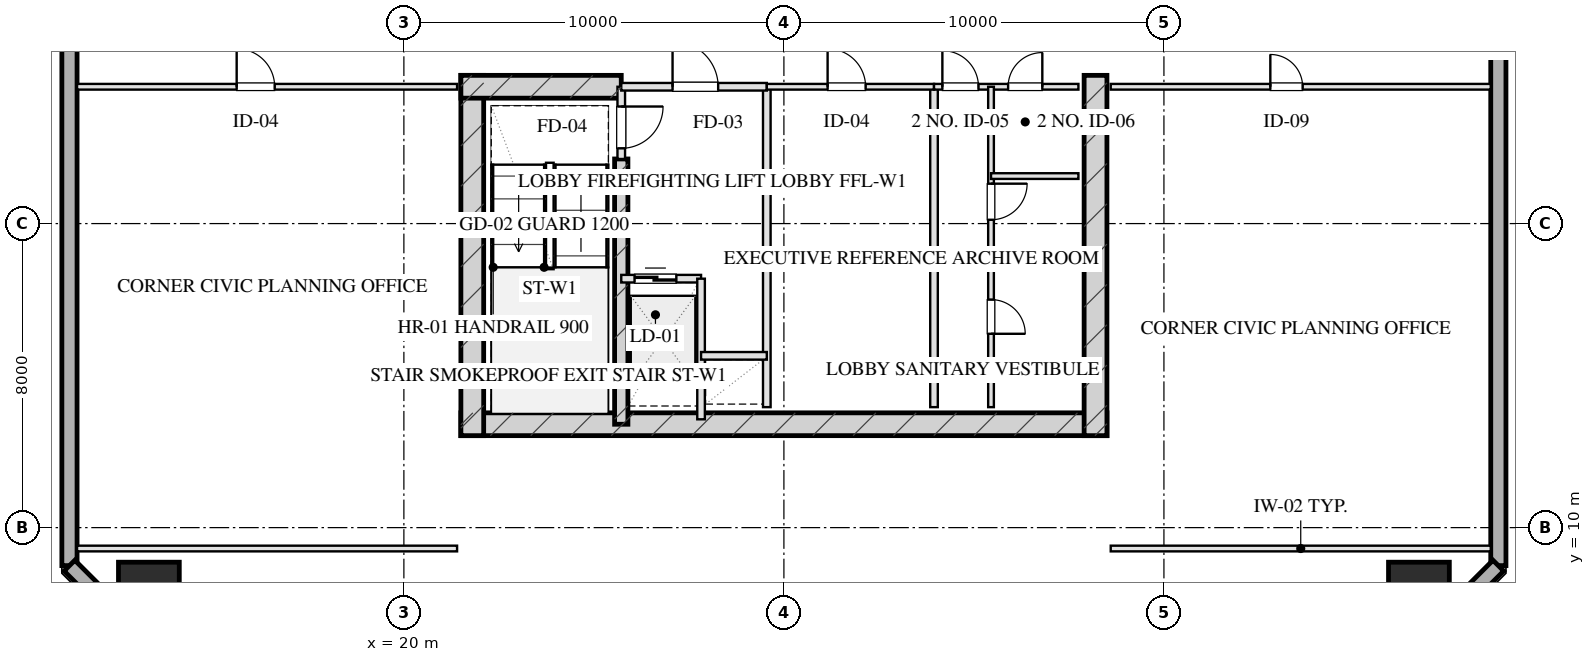
"""IFC4 building model, lengths in metres.
Left out: names, types, materials, properties, quantities, classifications, styles, units other than length and angle.
Written with IfcOpenShell. Run it as: python <this file> out.ifc"""

import sys

from ifc_helpers import new_model, si_unit, direction, frame, frame_2d, origin, origin_2d, place, context, subcontext, project, spatial, rectangle, hollow_rectangle, extrude, element, fill, save


model = new_model("IFC4")
c1 = context("Model", 3, precision=1e-05, world=origin(), true_north=direction((0.0, 1.0)))
c2 = subcontext(c1, "Body", "Model", "MODEL_VIEW")
j1 = project(units=[si_unit("LENGTHUNIT", "METRE"), si_unit("PLANEANGLEUNIT", "RADIAN")], contexts=[c1])
p1 = place(None, origin())
s1 = spatial("IfcSite", under=j1, at=p1, CompositionType="ELEMENT")
p2 = place(p1, origin())
s2 = spatial("IfcBuilding", under=s1, at=p2, CompositionType="ELEMENT")
p3 = place(p2, frame((0.0, 0.0, 142.6)))
s3 = spatial("IfcBuildingStorey", under=s2, at=p3, CompositionType="ELEMENT", Elevation=142.6)
p4 = place(p3, frame((21.5, 12.72, 0.0), z_axis=(0.0, 0.0, 1.0), x_axis=(1.0, 0.0, 0.0)))
e1 = element("IfcWall", 1, at=p4, inside=s3, PredefinedType="SHEAR", context=c2, shape_type="SweptSolid", body=[
    extrude(rectangle(XDim=17.0, YDim=0.6, at=frame_2d((8.5, 0.0))), origin(), (0.0, 0.0, 1.0), 3.45),
])
for number, where, z_axis, x_axis in (
    (2, (21.8, 21.9, 0.0), (0.0, 0.0, 1.0), (0.0, -1.0, 0.0)),
    (3, (38.2, 21.9, 0.0), (0.0, 0.0, 1.0), (0.0, -1.0, 0.0)),
):
    element("IfcWall", number, at=place(p3, frame(where, z_axis=z_axis, x_axis=x_axis)), inside=s3, PredefinedType="SHEAR", context=c2, shape_type="SweptSolid", body=[
        extrude(rectangle(XDim=9.48, YDim=0.6, at=frame_2d((4.74, 0.0))), origin(), (0.0, 0.0, 1.0), 3.45),
    ])
p5 = place(p3, frame((25.72, 19.7, 0.0), z_axis=(0.0, 0.0, 1.0), x_axis=(0.0, -1.0, 0.0)))
e4 = element("IfcWall", 4, at=p5, inside=s3, PredefinedType="SHEAR", context=c2, shape_type="SweptSolid", body=[
    extrude(rectangle(XDim=6.98, YDim=0.35, at=frame_2d((3.49, 0.0))), origin(), (0.0, 0.0, 1.0), 3.45),
])
p6 = place(p3, frame((21.5, 21.6, 0.0), z_axis=(0.0, 0.0, 1.0), x_axis=(1.0, 0.0, 0.0)))
e5 = element("IfcWall", 5, at=p6, inside=s3, PredefinedType="SHEAR", context=c2, shape_type="SweptSolid", body=[
    extrude(rectangle(XDim=4.22, YDim=0.6, at=frame_2d((2.11, 0.0))), origin(), (0.0, 0.0, 1.0), 3.45),
])
for number, where, z_axis, x_axis in (
    (6, (13.29, 8.29, 0.0), (0.0, 0.0, 1.0), (1.0, 0.0, 0.0)),
    (7, (46.71, 8.29, 0.0), (0.0, 0.0, 1.0), (1.0, 0.0, 0.0)),
):
    element("IfcColumn", number, at=place(p3, frame(where, z_axis=z_axis, x_axis=x_axis)), inside=s3, PredefinedType="COLUMN", context=c2, shape_type="SweptSolid", body=[
        extrude(hollow_rectangle(XDim=1.6, YDim=1.6, WallThickness=0.055, at=origin_2d()), origin(), (0.0, 0.0, 1.0), 3.451),
    ])
p7 = place(p3, frame((11.2, 9.0, 0.0), z_axis=(0.0, 0.0, 1.0), x_axis=(0.0, 1.0, 0.0)))
e8 = element("IfcWall", 8, at=p7, inside=s3, PredefinedType="SOLIDWALL", context=c2, shape_type="SweptSolid", body=[
    extrude(rectangle(XDim=50.0, YDim=0.4, at=frame_2d((25.0, 0.0))), origin(), (0.0, 0.0, 1.0), 2.61),
])
p8 = place(p7, frame((28.85, 0.0, 0.0)))
e9 = element("IfcOpeningElement", 9, at=p8, cuts=e8, PredefinedType="OPENING", context=c2, shape_type="SweptSolid", body=[
    extrude(rectangle(XDim=1.1, YDim=2.15, at=frame_2d((0.55, 1.075))), frame((0.0, 0.21, 0.0), z_axis=(0.0, -1.0, 0.0), x_axis=(1.0, 0.0, 0.0)), (0.0, 0.0, 1.0), 0.42),
])
p9 = place(p3, frame((48.8, 59.0, 0.0), z_axis=(0.0, 0.0, 1.0), x_axis=(0.0, -1.0, 0.0)))
e10 = element("IfcWall", 10, at=p9, inside=s3, PredefinedType="SOLIDWALL", context=c2, shape_type="SweptSolid", body=[
    extrude(rectangle(XDim=50.0, YDim=0.4, at=frame_2d((25.0, 0.0))), origin(), (0.0, 0.0, 1.0), 2.61),
])
p10 = place(p9, frame((30.275, 0.0, 0.75)))
e11 = element("IfcOpeningElement", 11, at=p10, cuts=e10, PredefinedType="OPENING", context=c2, shape_type="SweptSolid", body=[
    extrude(rectangle(XDim=2.25, YDim=1.46, at=frame_2d((1.125, 0.73))), frame((0.0, 0.21, 0.0), z_axis=(0.0, -1.0, 0.0), x_axis=(1.0, 0.0, 0.0)), (0.0, 0.0, 1.0), 0.42),
])
p11 = place(p9, frame((18.65, 0.0, 0.0)))
e12 = element("IfcOpeningElement", 12, at=p11, cuts=e10, PredefinedType="OPENING", context=c2, shape_type="SweptSolid", body=[
    extrude(rectangle(XDim=1.1, YDim=2.15, at=frame_2d((0.55, 1.075))), frame((0.0, 0.21, 0.0), z_axis=(0.0, -1.0, 0.0), x_axis=(1.0, 0.0, 0.0)), (0.0, 0.0, 1.0), 0.42),
])
for number, where, z_axis, x_axis in (
    (13, (48.8, 9.0, 0.0), (0.0, 0.0, 1.0), (-0.707, -0.707, 0.0)),
    (14, (14.0, 6.2, 0.0), (0.0, 0.0, 1.0), (-0.707, 0.707, 0.0)),
):
    element("IfcWall", number, at=place(p3, frame(where, z_axis=z_axis, x_axis=x_axis)), inside=s3, PredefinedType="SOLIDWALL", context=c2, shape_type="SweptSolid", body=[
        extrude(rectangle(XDim=3.96, YDim=0.4, at=frame_2d((1.98, 0.0))), origin(), (0.0, 0.0, 1.0), 2.61),
    ])
p12 = place(p3, frame((25.72, 21.6, 0.0), z_axis=(0.0, 0.0, 1.0), x_axis=(0.0, -1.0, 0.0)))
e15 = element("IfcWall", 15, at=p12, inside=s3, PredefinedType="PARTITIONING", context=c2, shape_type="SweptSolid", body=[
    extrude(rectangle(XDim=1.9, YDim=0.2, at=frame_2d((0.95, 0.0))), origin(), (0.0, 0.0, 1.0), 3.175),
])
p13 = place(p12, frame((0.52, 0.0, 0.0)))
e16 = element("IfcOpeningElement", 16, at=p13, cuts=e15, PredefinedType="OPENING", context=c2, shape_type="SweptSolid", body=[
    extrude(rectangle(XDim=1.1, YDim=2.05, at=frame_2d((0.55, 1.025))), frame((0.0, 0.11, 0.0), z_axis=(0.0, -1.0, 0.0), x_axis=(1.0, 0.0, 0.0)), (0.0, 0.0, 1.0), 0.22),
])
p14 = place(p3, frame((29.55, 21.6, 0.0), z_axis=(0.0, 0.0, 1.0), x_axis=(0.0, -1.0, 0.0)))
e17 = element("IfcWall", 17, at=p14, inside=s3, PredefinedType="PARTITIONING", context=c2, shape_type="SweptSolid", body=[
    extrude(rectangle(XDim=8.43, YDim=0.2, at=frame_2d((4.215, 0.0))), origin(), (0.0, 0.0, 1.0), 3.175),
])
p15 = place(p3, frame((25.72, 21.6, 0.0), z_axis=(0.0, 0.0, 1.0), x_axis=(1.0, 0.0, 0.0)))
e18 = element("IfcWall", 18, at=p15, inside=s3, PredefinedType="PARTITIONING", context=c2, shape_type="SweptSolid", body=[
    extrude(rectangle(XDim=3.83, YDim=0.2, at=frame_2d((1.915, 0.0))), origin(), (0.0, 0.0, 1.0), 3.175),
])
p16 = place(p15, frame((1.35, 0.0, 0.0)))
e19 = element("IfcOpeningElement", 19, at=p16, cuts=e18, PredefinedType="OPENING", context=c2, shape_type="SweptSolid", body=[
    extrude(rectangle(XDim=1.2, YDim=2.05, at=frame_2d((0.6, 1.025))), frame((0.0, 0.11, 0.0), z_axis=(0.0, -1.0, 0.0), x_axis=(1.0, 0.0, 0.0)), (0.0, 0.0, 1.0), 0.22),
])
p17 = place(p3, frame((25.72, 16.55, 0.0), z_axis=(0.0, 0.0, 1.0), x_axis=(1.0, 0.0, 0.0)))
e20 = element("IfcWall", 20, at=p17, inside=s3, PredefinedType="PARTITIONING", context=c2, shape_type="SweptSolid", body=[
    extrude(rectangle(XDim=2.1, YDim=0.2, at=frame_2d((1.05, 0.0))), origin(), (0.0, 0.0, 1.0), 3.175),
])
p18 = place(p17, frame((0.35, 0.0, 0.0)))
e21 = element("IfcOpeningElement", 21, at=p18, cuts=e20, PredefinedType="OPENING", context=c2, shape_type="SweptSolid", body=[
    extrude(rectangle(XDim=1.1, YDim=2.05, at=frame_2d((0.55, 1.025))), frame((0.0, 0.11, 0.0), z_axis=(0.0, -1.0, 0.0), x_axis=(1.0, 0.0, 0.0)), (0.0, 0.0, 1.0), 0.22),
])
p19 = place(p3, frame((27.82, 16.55, 0.0), z_axis=(0.0, 0.0, 1.0), x_axis=(0.0, -1.0, 0.0)))
e22 = element("IfcWall", 22, at=p19, inside=s3, PredefinedType="PARTITIONING", context=c2, shape_type="SweptSolid", body=[
    extrude(rectangle(XDim=3.7, YDim=0.2, at=frame_2d((1.85, 0.0))), origin(), (0.0, 0.0, 1.0), 3.175),
])
p20 = place(p3, frame((27.82, 14.52, 0.0), z_axis=(0.0, 0.0, 1.0), x_axis=(1.0, 0.0, 0.0)))
e23 = element("IfcWall", 23, at=p20, inside=s3, PredefinedType="PARTITIONING", context=c2, shape_type="SweptSolid", body=[
    extrude(rectangle(XDim=1.73, YDim=0.2, at=frame_2d((0.865, 0.0))), origin(), (0.0, 0.0, 1.0), 3.175),
])
p21 = place(p3, frame((33.95, 21.6, 0.0), z_axis=(0.0, 0.0, 1.0), x_axis=(0.0, -1.0, 0.0)))
e24 = element("IfcWall", 24, at=p21, inside=s3, PredefinedType="PARTITIONING", context=c2, shape_type="SweptSolid", body=[
    extrude(rectangle(XDim=8.43, YDim=0.2, at=frame_2d((4.215, 0.0))), origin(), (0.0, 0.0, 1.0), 3.175),
])
p22 = place(p3, frame((29.55, 21.6, 0.0), z_axis=(0.0, 0.0, 1.0), x_axis=(1.0, 0.0, 0.0)))
e25 = element("IfcWall", 25, at=p22, inside=s3, PredefinedType="PARTITIONING", context=c2, shape_type="SweptSolid", body=[
    extrude(rectangle(XDim=4.4, YDim=0.15, at=frame_2d((2.2, 0.0))), origin(), (0.0, 0.0, 1.0), 3.175),
])
p23 = place(p22, frame((1.6, 0.0, 0.0)))
e26 = element("IfcOpeningElement", 26, at=p23, cuts=e25, PredefinedType="OPENING", context=c2, shape_type="SweptSolid", body=[
    extrude(rectangle(XDim=1.0, YDim=2.05, at=frame_2d((0.5, 1.025))), frame((0.0, 0.085, 0.0), z_axis=(0.0, -1.0, 0.0), x_axis=(1.0, 0.0, 0.0)), (0.0, 0.0, 1.0), 0.17),
])
p24 = place(p3, frame((33.95, 21.6, 0.0), z_axis=(0.0, 0.0, 1.0), x_axis=(1.0, 0.0, 0.0)))
e27 = element("IfcWall", 27, at=p24, inside=s3, PredefinedType="PARTITIONING", context=c2, shape_type="SweptSolid", body=[
    extrude(rectangle(XDim=3.8, YDim=0.15, at=frame_2d((1.9, 0.0))), origin(), (0.0, 0.0, 1.0), 3.175),
])
p25 = place(p24, frame((0.22, 0.0, 0.0)))
e28 = element("IfcOpeningElement", 28, at=p25, cuts=e27, PredefinedType="OPENING", context=c2, shape_type="SweptSolid", body=[
    extrude(rectangle(XDim=0.95, YDim=2.05, at=frame_2d((0.475, 1.025))), frame((0.0, 0.085, 0.0), z_axis=(0.0, -1.0, 0.0), x_axis=(1.0, 0.0, 0.0)), (0.0, 0.0, 1.0), 0.17),
])
p26 = place(p24, frame((1.95, 0.0, 0.0)))
e29 = element("IfcOpeningElement", 29, at=p26, cuts=e27, PredefinedType="OPENING", context=c2, shape_type="SweptSolid", body=[
    extrude(rectangle(XDim=0.9, YDim=2.05, at=frame_2d((0.45, 1.025))), frame((0.0, 0.085, 0.0), z_axis=(0.0, -1.0, 0.0), x_axis=(1.0, 0.0, 0.0)), (0.0, 0.0, 1.0), 0.17),
])
p27 = place(p3, frame((35.45, 21.6, 0.0), z_axis=(0.0, 0.0, 1.0), x_axis=(0.0, -1.0, 0.0)))
e30 = element("IfcWall", 30, at=p27, inside=s3, PredefinedType="PARTITIONING", context=c2, shape_type="SweptSolid", body=[
    extrude(rectangle(XDim=8.43, YDim=0.15, at=frame_2d((4.215, 0.0))), origin(), (0.0, 0.0, 1.0), 2.815),
])
p28 = place(p27, frame((2.55, 0.0, 0.0)))
e31 = element("IfcOpeningElement", 31, at=p28, cuts=e30, PredefinedType="OPENING", context=c2, shape_type="SweptSolid", body=[
    extrude(rectangle(XDim=0.95, YDim=2.05, at=frame_2d((0.475, 1.025))), frame((0.0, 0.085, 0.0), z_axis=(0.0, -1.0, 0.0), x_axis=(1.0, 0.0, 0.0)), (0.0, 0.0, 1.0), 0.17),
])
p29 = place(p27, frame((5.6, 0.0, 0.0)))
e32 = element("IfcOpeningElement", 32, at=p29, cuts=e30, PredefinedType="OPENING", context=c2, shape_type="SweptSolid", body=[
    extrude(rectangle(XDim=0.9, YDim=2.05, at=frame_2d((0.45, 1.025))), frame((0.0, 0.085, 0.0), z_axis=(0.0, -1.0, 0.0), x_axis=(1.0, 0.0, 0.0)), (0.0, 0.0, 1.0), 0.17),
])
for number, where, z_axis, x_axis in (
    (33, (35.45, 17.2, 0.0), (0.0, 0.0, 1.0), (1.0, 0.0, 0.0)),
    (34, (35.45, 19.25, 0.0), (0.0, 0.0, 1.0), (1.0, 0.0, 0.0)),
):
    element("IfcWall", number, at=place(p3, frame(where, z_axis=z_axis, x_axis=x_axis)), inside=s3, PredefinedType="PARTITIONING", context=c2, shape_type="SweptSolid", body=[
        extrude(rectangle(XDim=2.3, YDim=0.15, at=frame_2d((1.15, 0.0))), origin(), (0.0, 0.0, 1.0), 3.175),
    ])
p30 = place(p3, frame((11.4, 9.45, 0.0), z_axis=(0.0, 0.0, 1.0), x_axis=(1.0, 0.0, 0.0)))
e35 = element("IfcWall", 35, at=p30, inside=s3, PredefinedType="PARTITIONING", context=c2, shape_type="SweptSolid", body=[
    extrude(rectangle(XDim=10.0, YDim=0.15, at=frame_2d((5.0, 0.0))), origin(), (0.0, 0.0, 1.0), 3.175),
])
p31 = place(p3, frame((11.4, 21.6, 0.0), z_axis=(0.0, 0.0, 1.0), x_axis=(1.0, 0.0, 0.0)))
e36 = element("IfcWall", 36, at=p31, inside=s3, PredefinedType="PARTITIONING", context=c2, shape_type="SweptSolid", body=[
    extrude(rectangle(XDim=10.0, YDim=0.15, at=frame_2d((5.0, 0.0))), origin(), (0.0, 0.0, 1.0), 3.175),
])
p32 = place(p31, frame((4.2, 0.0, 0.0)))
e37 = element("IfcOpeningElement", 37, at=p32, cuts=e36, PredefinedType="OPENING", context=c2, shape_type="SweptSolid", body=[
    extrude(rectangle(XDim=1.0, YDim=2.05, at=frame_2d((0.5, 1.025))), frame((0.0, 0.085, 0.0), z_axis=(0.0, -1.0, 0.0), x_axis=(1.0, 0.0, 0.0)), (0.0, 0.0, 1.0), 0.17),
])
p33 = place(p3, frame((38.6, 9.45, 0.0), z_axis=(0.0, 0.0, 1.0), x_axis=(1.0, 0.0, 0.0)))
e38 = element("IfcWall", 38, at=p33, inside=s3, PredefinedType="PARTITIONING", context=c2, shape_type="SweptSolid", body=[
    extrude(rectangle(XDim=10.0, YDim=0.15, at=frame_2d((5.0, 0.0))), origin(), (0.0, 0.0, 1.0), 3.175),
])
p34 = place(p3, frame((38.6, 21.6, 0.0), z_axis=(0.0, 0.0, 1.0), x_axis=(1.0, 0.0, 0.0)))
e39 = element("IfcWall", 39, at=p34, inside=s3, PredefinedType="PARTITIONING", context=c2, shape_type="SweptSolid", body=[
    extrude(rectangle(XDim=10.0, YDim=0.15, at=frame_2d((5.0, 0.0))), origin(), (0.0, 0.0, 1.0), 3.175),
])
p35 = place(p34, frame((4.2, 0.0, 0.0)))
e40 = element("IfcOpeningElement", 40, at=p35, cuts=e39, PredefinedType="OPENING", context=c2, shape_type="SweptSolid", body=[
    extrude(rectangle(XDim=0.85, YDim=2.05, at=frame_2d((0.425, 1.025))), frame((0.0, 0.085, 0.0), z_axis=(0.0, -1.0, 0.0), x_axis=(1.0, 0.0, 0.0)), (0.0, 0.0, 1.0), 0.17),
])
p36 = place(p13, origin())
e41 = element("IfcDoor", 41, at=p36, inside=s3, OperationType="SINGLE_SWING_LEFT", PredefinedType="DOOR", context=c2, shape_type="SweptSolid", body=[
    extrude(rectangle(XDim=1.1, YDim=2.05, at=frame_2d((0.55, 1.025))), frame((0.0, 0.025, 0.0), z_axis=(0.0, -1.0, 0.0), x_axis=(1.0, 0.0, 0.0)), (0.0, 0.0, 1.0), 0.05),
])
fill(e16, e41)
p37 = place(p16, origin())
e42 = element("IfcDoor", 42, at=p37, inside=s3, OperationType="SINGLE_SWING_LEFT", PredefinedType="DOOR", context=c2, shape_type="SweptSolid", body=[
    extrude(rectangle(XDim=1.2, YDim=2.05, at=frame_2d((0.6, 1.025))), frame((0.0, 0.025, 0.0), z_axis=(0.0, -1.0, 0.0), x_axis=(1.0, 0.0, 0.0)), (0.0, 0.0, 1.0), 0.05),
])
fill(e19, e42)
p38 = place(p18, origin())
e43 = element("IfcDoor", 43, at=p38, inside=s3, OperationType="DOUBLE_DOOR_SLIDING", PredefinedType="DOOR", context=c2, shape_type="SweptSolid", body=[
    extrude(rectangle(XDim=1.1, YDim=2.05, at=frame_2d((0.55, 1.025))), frame((0.0, 0.025, 0.0), z_axis=(0.0, -1.0, 0.0), x_axis=(1.0, 0.0, 0.0)), (0.0, 0.0, 1.0), 0.05),
])
fill(e21, e43)
p39 = place(p23, origin())
e44 = element("IfcDoor", 44, at=p39, inside=s3, OperationType="SINGLE_SWING_LEFT", PredefinedType="DOOR", context=c2, shape_type="SweptSolid", body=[
    extrude(rectangle(XDim=1.0, YDim=2.05, at=frame_2d((0.5, 1.025))), frame((0.0, 0.025, 0.0), z_axis=(0.0, -1.0, 0.0), x_axis=(1.0, 0.0, 0.0)), (0.0, 0.0, 1.0), 0.05),
])
fill(e26, e44)
p40 = place(p25, origin())
e45 = element("IfcDoor", 45, at=p40, inside=s3, OperationType="SINGLE_SWING_LEFT", PredefinedType="DOOR", context=c2, shape_type="SweptSolid", body=[
    extrude(rectangle(XDim=0.95, YDim=2.05, at=frame_2d((0.475, 1.025))), frame((0.0, 0.025, 0.0), z_axis=(0.0, -1.0, 0.0), x_axis=(1.0, 0.0, 0.0)), (0.0, 0.0, 1.0), 0.05),
])
fill(e28, e45)
p41 = place(p26, origin())
e46 = element("IfcDoor", 46, at=p41, inside=s3, OperationType="SINGLE_SWING_RIGHT", PredefinedType="DOOR", context=c2, shape_type="SweptSolid", body=[
    extrude(rectangle(XDim=0.9, YDim=2.05, at=frame_2d((0.45, 1.025))), frame((0.0, 0.025, 0.0), z_axis=(0.0, -1.0, 0.0), x_axis=(1.0, 0.0, 0.0)), (0.0, 0.0, 1.0), 0.05),
])
fill(e29, e46)
p42 = place(p28, origin())
e47 = element("IfcDoor", 47, at=p42, inside=s3, OperationType="SINGLE_SWING_LEFT", PredefinedType="DOOR", context=c2, shape_type="SweptSolid", body=[
    extrude(rectangle(XDim=0.95, YDim=2.05, at=frame_2d((0.475, 1.025))), frame((0.0, 0.025, 0.0), z_axis=(0.0, -1.0, 0.0), x_axis=(1.0, 0.0, 0.0)), (0.0, 0.0, 1.0), 0.05),
])
fill(e31, e47)
p43 = place(p29, origin())
e48 = element("IfcDoor", 48, at=p43, inside=s3, OperationType="SINGLE_SWING_RIGHT", PredefinedType="DOOR", context=c2, shape_type="SweptSolid", body=[
    extrude(rectangle(XDim=0.9, YDim=2.05, at=frame_2d((0.45, 1.025))), frame((0.0, 0.025, 0.0), z_axis=(0.0, -1.0, 0.0), x_axis=(1.0, 0.0, 0.0)), (0.0, 0.0, 1.0), 0.05),
])
fill(e32, e48)
p44 = place(p32, origin())
e49 = element("IfcDoor", 49, at=p44, inside=s3, OperationType="SINGLE_SWING_LEFT", PredefinedType="DOOR", context=c2, shape_type="SweptSolid", body=[
    extrude(rectangle(XDim=1.0, YDim=2.05, at=frame_2d((0.5, 1.025))), frame((0.0, 0.025, 0.0), z_axis=(0.0, -1.0, 0.0), x_axis=(1.0, 0.0, 0.0)), (0.0, 0.0, 1.0), 0.05),
])
fill(e37, e49)
p45 = place(p35, origin())
e50 = element("IfcDoor", 50, at=p45, inside=s3, OperationType="SINGLE_SWING_LEFT", PredefinedType="DOOR", context=c2, shape_type="SweptSolid", body=[
    extrude(rectangle(XDim=0.85, YDim=2.05, at=frame_2d((0.425, 1.025))), frame((0.0, 0.025, 0.0), z_axis=(0.0, -1.0, 0.0), x_axis=(1.0, 0.0, 0.0)), (0.0, 0.0, 1.0), 0.05),
])
fill(e40, e50)
save(model, sys.argv[1])
